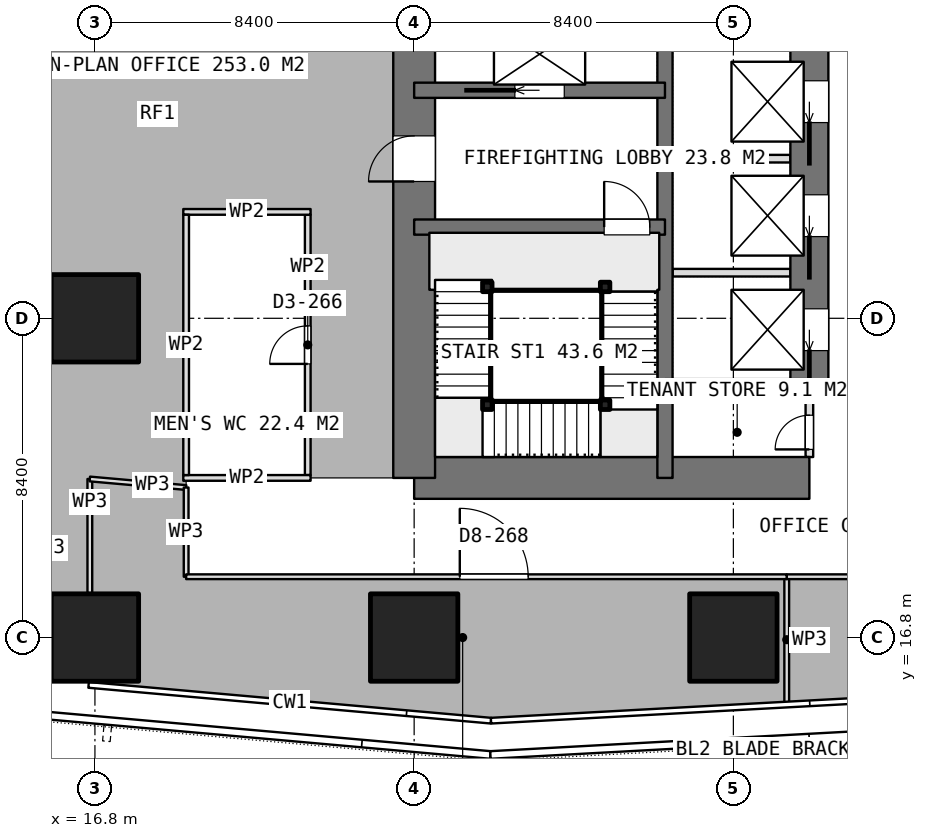
"""IFC4 building model, lengths in metres.
Left out: names, types, materials, properties, quantities, classifications, styles, units other than length and angle.
Written with IfcOpenShell. Run it as: python <this file> out.ifc"""

import sys

from ifc_helpers import new_model, si_unit, direction, frame, frame_2d, origin, origin_2d, place, context, subcontext, project, spatial, rectangle, extrude, element, fill, save


model = new_model("IFC4")
c1 = context("Model", 3, precision=1e-05, world=origin(), true_north=direction((0.0, 1.0)))
c2 = subcontext(c1, "Body", "Model", "MODEL_VIEW")
j1 = project(units=[si_unit("LENGTHUNIT", "METRE"), si_unit("PLANEANGLEUNIT", "RADIAN")], contexts=[c1])
p1 = place(None, origin())
s1 = spatial("IfcSite", under=j1, at=p1, CompositionType="ELEMENT")
p2 = place(p1, origin())
s2 = spatial("IfcBuilding", under=s1, at=p2, CompositionType="ELEMENT")
p3 = place(p2, frame((0.0, 0.0, 250.1)))
s3 = spatial("IfcBuildingStorey", under=s2, at=p3, CompositionType="ELEMENT", Elevation=250.1)
p4 = place(p3, frame((25.2, 21.0, 0.0), z_axis=(0.0, 0.0, 1.0), x_axis=(1.0, 0.0, 0.0)))
e1 = element("IfcWall", 1, at=p4, inside=s3, PredefinedType="SHEAR", context=c2, shape_type="SweptSolid", body=[
    extrude(rectangle(XDim=10.4, YDim=1.1, at=frame_2d((5.2, 0.0))), origin(), (0.0, 0.0, 1.0), 3.75),
])
p5 = place(p3, frame((25.2, 21.0, 0.0), z_axis=(0.0, 0.0, 1.0), x_axis=(0.0, 1.0, 0.0)))
e2 = element("IfcWall", 2, at=p5, inside=s3, PredefinedType="SHEAR", context=c2, shape_type="SweptSolid", body=[
    extrude(rectangle(XDim=25.2, YDim=1.1, at=frame_2d((12.6, 0.0))), origin(), (0.0, 0.0, 1.0), 3.75),
])
p6 = place(p5, frame((7.8, 0.0, 0.0)))
e3 = element("IfcOpeningElement", 3, at=p6, cuts=e2, PredefinedType="OPENING", context=c2, shape_type="SweptSolid", body=[
    extrude(rectangle(XDim=1.2, YDim=2.1, at=frame_2d((0.6, 1.05))), frame((0.0, 0.56, 0.0), z_axis=(0.0, -1.0, 0.0), x_axis=(1.0, 0.0, 0.0)), (0.0, 0.0, 1.0), 1.12),
])
p7 = place(p5, frame((14.25, 0.0, 0.0)))
e4 = element("IfcOpeningElement", 4, at=p7, cuts=e2, PredefinedType="OPENING", context=c2, shape_type="SweptSolid", body=[
    extrude(rectangle(XDim=0.9, YDim=2.1, at=frame_2d((0.45, 1.05))), frame((0.0, 0.56, 0.0), z_axis=(0.0, -1.0, 0.0), x_axis=(1.0, 0.0, 0.0)), (0.0, 0.0, 1.0), 1.12),
])
p8 = place(p5, frame((16.85, 0.0, 0.0)))
e5 = element("IfcOpeningElement", 5, at=p8, cuts=e2, PredefinedType="OPENING", context=c2, shape_type="SweptSolid", body=[
    extrude(rectangle(XDim=0.9, YDim=2.1, at=frame_2d((0.45, 1.05))), frame((0.0, 0.56, 0.0), z_axis=(0.0, -1.0, 0.0), x_axis=(1.0, 0.0, 0.0)), (0.0, 0.0, 1.0), 1.12),
])
p9 = place(p5, frame((19.0, 0.0, 0.0)))
e6 = element("IfcOpeningElement", 6, at=p9, cuts=e2, PredefinedType="OPENING", context=c2, shape_type="SweptSolid", body=[
    extrude(rectangle(XDim=1.2, YDim=2.1, at=frame_2d((0.6, 1.05))), frame((0.0, 0.56, 0.0), z_axis=(0.0, -1.0, 0.0), x_axis=(1.0, 0.0, 0.0)), (0.0, 0.0, 1.0), 1.12),
])
p10 = place(p3, frame((31.8, 21.0, 0.0), z_axis=(0.0, 0.0, 1.0), x_axis=(0.0, 1.0, 0.0)))
e7 = element("IfcWall", 7, at=p10, inside=s3, PredefinedType="SHEAR", context=c2, shape_type="SweptSolid", body=[
    extrude(rectangle(XDim=25.2, YDim=0.4, at=frame_2d((12.6, 0.0))), origin(), (0.0, 0.0, 1.0), 3.75),
])
p11 = place(p3, frame((35.6, 23.4, 0.0), z_axis=(0.0, 0.0, 1.0), x_axis=(0.0, 1.0, 0.0)))
e8 = element("IfcWall", 8, at=p11, inside=s3, PredefinedType="SHEAR", context=c2, shape_type="SweptSolid", body=[
    extrude(rectangle(XDim=18.0, YDim=1.0, at=frame_2d((9.0, 0.0))), origin(), (0.0, 0.0, 1.0), 3.75),
])
p12 = place(p11, frame((0.95, 0.0, 0.0)))
e9 = element("IfcOpeningElement", 9, at=p12, cuts=e8, PredefinedType="OPENING", context=c2, shape_type="SweptSolid", body=[
    extrude(rectangle(XDim=1.1, YDim=2.1, at=frame_2d((0.55, 1.05))), frame((0.0, 0.51, 0.0), z_axis=(0.0, -1.0, 0.0), x_axis=(1.0, 0.0, 0.0)), (0.0, 0.0, 1.0), 1.02),
])
p13 = place(p11, frame((3.95, 0.0, 0.0)))
e10 = element("IfcOpeningElement", 10, at=p13, cuts=e8, PredefinedType="OPENING", context=c2, shape_type="SweptSolid", body=[
    extrude(rectangle(XDim=1.1, YDim=2.1, at=frame_2d((0.55, 1.05))), frame((0.0, 0.51, 0.0), z_axis=(0.0, -1.0, 0.0), x_axis=(1.0, 0.0, 0.0)), (0.0, 0.0, 1.0), 1.02),
])
p14 = place(p11, frame((6.95, 0.0, 0.0)))
e11 = element("IfcOpeningElement", 11, at=p14, cuts=e8, PredefinedType="OPENING", context=c2, shape_type="SweptSolid", body=[
    extrude(rectangle(XDim=1.1, YDim=2.1, at=frame_2d((0.55, 1.05))), frame((0.0, 0.51, 0.0), z_axis=(0.0, -1.0, 0.0), x_axis=(1.0, 0.0, 0.0)), (0.0, 0.0, 1.0), 1.02),
])
p15 = place(p11, frame((9.95, 0.0, 0.0)))
e12 = element("IfcOpeningElement", 12, at=p15, cuts=e8, PredefinedType="OPENING", context=c2, shape_type="SweptSolid", body=[
    extrude(rectangle(XDim=1.1, YDim=2.1, at=frame_2d((0.55, 1.05))), frame((0.0, 0.51, 0.0), z_axis=(0.0, -1.0, 0.0), x_axis=(1.0, 0.0, 0.0)), (0.0, 0.0, 1.0), 1.02),
])
p16 = place(p11, frame((12.95, 0.0, 0.0)))
e13 = element("IfcOpeningElement", 13, at=p16, cuts=e8, PredefinedType="OPENING", context=c2, shape_type="SweptSolid", body=[
    extrude(rectangle(XDim=1.1, YDim=2.1, at=frame_2d((0.55, 1.05))), frame((0.0, 0.51, 0.0), z_axis=(0.0, -1.0, 0.0), x_axis=(1.0, 0.0, 0.0)), (0.0, 0.0, 1.0), 1.02),
])
p17 = place(p11, frame((15.95, 0.0, 0.0)))
e14 = element("IfcOpeningElement", 14, at=p17, cuts=e8, PredefinedType="OPENING", context=c2, shape_type="SweptSolid", body=[
    extrude(rectangle(XDim=1.1, YDim=2.1, at=frame_2d((0.55, 1.05))), frame((0.0, 0.51, 0.0), z_axis=(0.0, -1.0, 0.0), x_axis=(1.0, 0.0, 0.0)), (0.0, 0.0, 1.0), 1.02),
])
p18 = place(p3, frame((31.8, 23.4, 0.0), z_axis=(0.0, 0.0, 1.0), x_axis=(1.0, 0.0, 0.0)))
e15 = element("IfcWall", 15, at=p18, inside=s3, PredefinedType="SHEAR", context=c2, shape_type="SweptSolid", body=[
    extrude(rectangle(XDim=3.8, YDim=0.4, at=frame_2d((1.9, 0.0))), origin(), (0.0, 0.0, 1.0), 3.75),
])
p19 = place(p3, frame((25.2, 27.6, 0.0), z_axis=(0.0, 0.0, 1.0), x_axis=(1.0, 0.0, 0.0)))
e16 = element("IfcWall", 16, at=p19, inside=s3, PredefinedType="SHEAR", context=c2, shape_type="SweptSolid", body=[
    extrude(rectangle(XDim=6.6, YDim=0.4, at=frame_2d((3.3, 0.0))), origin(), (0.0, 0.0, 1.0), 3.75),
])
p20 = place(p19, frame((5.0, 0.0, 0.0)))
e17 = element("IfcOpeningElement", 17, at=p20, cuts=e16, PredefinedType="OPENING", context=c2, shape_type="SweptSolid", body=[
    extrude(rectangle(XDim=1.2, YDim=2.1, at=frame_2d((0.6, 1.05))), frame((0.0, 0.21, 0.0), z_axis=(0.0, -1.0, 0.0), x_axis=(1.0, 0.0, 0.0)), (0.0, 0.0, 1.0), 0.42),
])
p21 = place(p3, frame((25.2, 31.2, 0.0), z_axis=(0.0, 0.0, 1.0), x_axis=(1.0, 0.0, 0.0)))
e18 = element("IfcWall", 18, at=p21, inside=s3, PredefinedType="SHEAR", context=c2, shape_type="SweptSolid", body=[
    extrude(rectangle(XDim=6.6, YDim=0.4, at=frame_2d((3.3, 0.0))), origin(), (0.0, 0.0, 1.0), 3.75),
])
p22 = place(p21, frame((2.65, 0.0, 0.0)))
e19 = element("IfcOpeningElement", 19, at=p22, cuts=e18, PredefinedType="OPENING", context=c2, shape_type="SweptSolid", body=[
    extrude(rectangle(XDim=1.3, YDim=2.1, at=frame_2d((0.65, 1.05))), frame((0.0, 0.21, 0.0), z_axis=(0.0, -1.0, 0.0), x_axis=(1.0, 0.0, 0.0)), (0.0, 0.0, 1.0), 0.42),
])
for number, where, z_axis, x_axis in (
    (20, (16.8, 16.8, 0.0), (0.0, 0.0, 1.0), (1.0, 0.0, 0.0)),
    (21, (16.8, 25.2, 0.0), (0.0, 0.0, 1.0), (1.0, 0.0, 0.0)),
    (22, (25.2, 16.8, 0.0), (0.0, 0.0, 1.0), (1.0, 0.0, 0.0)),
    (23, (33.6, 16.8, 0.0), (0.0, 0.0, 1.0), (1.0, 0.0, 0.0)),
):
    element("IfcColumn", number, at=place(p3, frame(where, z_axis=z_axis, x_axis=x_axis)), inside=s3, PredefinedType="COLUMN", context=c2, shape_type="SweptSolid", body=[
        extrude(rectangle(XDim=2.3, YDim=2.3, at=origin_2d()), origin(), (0.0, 0.0, 1.0), 3.75),
    ])
for number, where, z_axis, x_axis in (
    (24, (32.0, 26.4, 0.0), (0.0, 0.0, 1.0), (1.0, 0.0, 0.0)),
    (25, (32.0, 29.4, 0.0), (0.0, 0.0, 1.0), (1.0, 0.0, 0.0)),
):
    element("IfcWall", number, at=place(p3, frame(where, z_axis=z_axis, x_axis=x_axis)), inside=s3, PredefinedType="PARTITIONING", context=c2, shape_type="SweptSolid", body=[
        extrude(rectangle(XDim=3.1, YDim=0.2, at=frame_2d((1.55, 0.0))), origin(), (0.0, 0.0, 1.0), 3.5),
    ])
p23 = place(p3, frame((35.6, 21.55, 0.0), z_axis=(0.0, 0.0, 1.0), x_axis=(0.0, 1.0, 0.0)))
e26 = element("IfcWall", 26, at=p23, inside=s3, PredefinedType="PARTITIONING", context=c2, shape_type="SweptSolid", body=[
    extrude(rectangle(XDim=1.65, YDim=0.2, at=frame_2d((0.825, 0.0))), origin(), (0.0, 0.0, 1.0), 3.5),
])
p24 = place(p23, frame((0.2, 0.0, 0.0)))
e27 = element("IfcOpeningElement", 27, at=p24, cuts=e26, PredefinedType="OPENING", context=c2, shape_type="SweptSolid", body=[
    extrude(rectangle(XDim=0.9, YDim=2.1, at=frame_2d((0.45, 1.05))), frame((0.0, 0.11, 0.0), z_axis=(0.0, -1.0, 0.0), x_axis=(1.0, 0.0, 0.0)), (0.0, 0.0, 1.0), 0.22),
])
for number, where, z_axis, x_axis in (
    (28, (19.125, 21.0, 0.0), (0.0, 0.0, 1.0), (1.0, 0.0, 0.0)),
    (29, (19.125, 28.0, 0.0), (0.0, 0.0, 1.0), (1.0, 0.0, 0.0)),
):
    element("IfcWall", number, at=place(p3, frame(where, z_axis=z_axis, x_axis=x_axis)), inside=s3, PredefinedType="PARTITIONING", context=c2, shape_type="SweptSolid", body=[
        extrude(rectangle(XDim=3.35, YDim=0.15, at=frame_2d((1.675, 0.0))), origin(), (0.0, 0.0, 1.0), 3.5),
    ])
p25 = place(p3, frame((19.2, 21.075, 0.0), z_axis=(0.0, 0.0, 1.0), x_axis=(0.0, 1.0, 0.0)))
e30 = element("IfcWall", 30, at=p25, inside=s3, PredefinedType="PARTITIONING", context=c2, shape_type="SweptSolid", body=[
    extrude(rectangle(XDim=6.85, YDim=0.15, at=frame_2d((3.425, 0.0))), origin(), (0.0, 0.0, 1.0), 3.5),
])
p26 = place(p3, frame((22.4, 21.075, 0.0), z_axis=(0.0, 0.0, 1.0), x_axis=(0.0, 1.0, 0.0)))
e31 = element("IfcWall", 31, at=p26, inside=s3, PredefinedType="PARTITIONING", context=c2, shape_type="SweptSolid", body=[
    extrude(rectangle(XDim=6.85, YDim=0.15, at=frame_2d((3.425, 0.0))), origin(), (0.0, 0.0, 1.0), 3.5),
])
p27 = place(p26, frame((2.925, 0.0, 0.0)))
e32 = element("IfcOpeningElement", 32, at=p27, cuts=e31, PredefinedType="OPENING", context=c2, shape_type="SweptSolid", body=[
    extrude(rectangle(XDim=1.0, YDim=2.1, at=frame_2d((0.5, 1.05))), frame((0.0, 0.085, 0.0), z_axis=(0.0, -1.0, 0.0), x_axis=(1.0, 0.0, 0.0)), (0.0, 0.0, 1.0), 0.17),
])
p28 = place(p3, frame((35.004, 15.087, 0.0), z_axis=(0.0, 0.0, 1.0), x_axis=(0.0, 1.0, 0.0)))
e33 = element("IfcWall", 33, at=p28, inside=s3, PredefinedType="PARTITIONING", context=c2, shape_type="SweptSolid", body=[
    extrude(rectangle(XDim=3.313, YDim=0.125, at=frame_2d((1.656, 0.0))), origin(), (0.0, 0.0, 1.0), 3.5),
])
p29 = place(p3, frame((35.004, 18.4, 0.0), z_axis=(0.0, 0.0, 1.0), x_axis=(1.0, 0.0, 0.0)))
e34 = element("IfcWall", 34, at=p29, inside=s3, PredefinedType="PARTITIONING", context=c2, shape_type="SweptSolid", body=[
    extrude(rectangle(XDim=16.604, YDim=0.125, at=frame_2d((8.302, 0.0))), origin(), (0.0, 0.0, 1.0), 3.5),
])
p30 = place(p29, frame((8.202, 0.0, 0.0)))
e35 = element("IfcOpeningElement", 35, at=p30, cuts=e34, PredefinedType="OPENING", context=c2, shape_type="SweptSolid", body=[
    extrude(rectangle(XDim=1.8, YDim=2.1, at=frame_2d((0.9, 1.05))), frame((0.0, 0.073, 0.0), z_axis=(0.0, -1.0, 0.0), x_axis=(1.0, 0.0, 0.0)), (0.0, 0.0, 1.0), 0.145),
])
p31 = place(p3, frame((16.666, 17.97, 0.0), z_axis=(0.0, 0.0, 1.0), x_axis=(0.0, 1.0, 0.0)))
e36 = element("IfcWall", 36, at=p31, inside=s3, PredefinedType="PARTITIONING", context=c2, shape_type="SweptSolid", body=[
    extrude(rectangle(XDim=3.002, YDim=0.125, at=frame_2d((1.501, 0.0))), origin(), (0.0, 0.0, 1.0), 3.5),
])
p32 = place(p3, frame((16.666, 20.972, 0.0), z_axis=(0.0, 0.0, 1.0), x_axis=(0.996085983525, -0.08838955495, 0.0)))
e37 = element("IfcWall", 37, at=p32, inside=s3, PredefinedType="PARTITIONING", context=c2, shape_type="SweptSolid", body=[
    extrude(rectangle(XDim=2.544, YDim=0.125, at=frame_2d((1.272, 0.0))), origin(), (0.0, 0.0, 1.0), 3.5),
])
p33 = place(p3, frame((19.2, 20.747, 0.0), z_axis=(0.0, 0.0, 1.0), x_axis=(0.0, -1.0, 0.0)))
e38 = element("IfcWall", 38, at=p33, inside=s3, PredefinedType="PARTITIONING", context=c2, shape_type="SweptSolid", body=[
    extrude(rectangle(XDim=2.347, YDim=0.125, at=frame_2d((1.174, 0.0))), origin(), (0.0, 0.0, 1.0), 3.5),
])
p34 = place(p3, frame((19.2, 18.4, 0.0), z_axis=(0.0, 0.0, 1.0), x_axis=(1.0, 0.0, 0.0)))
e39 = element("IfcWall", 39, at=p34, inside=s3, PredefinedType="PARTITIONING", context=c2, shape_type="SweptSolid", body=[
    extrude(rectangle(XDim=15.803, YDim=0.125, at=frame_2d((7.901, 0.0))), origin(), (0.0, 0.0, 1.0), 3.5),
])
p35 = place(p34, frame((7.201, 0.0, 0.0)))
e40 = element("IfcOpeningElement", 40, at=p35, cuts=e39, PredefinedType="OPENING", context=c2, shape_type="SweptSolid", body=[
    extrude(rectangle(XDim=1.8, YDim=2.1, at=frame_2d((0.9, 1.05))), frame((0.0, 0.073, 0.0), z_axis=(0.0, -1.0, 0.0), x_axis=(1.0, 0.0, 0.0)), (0.0, 0.0, 1.0), 0.145),
])
for number, where, z_axis, x_axis in (
    (41, (30.225, 26.025, 0.0), (0.0, 0.0, 1.0), (1.0, 0.0, 0.0)),
    (42, (30.225, 22.925, 0.0), (0.0, 0.0, 1.0), (1.0, 0.0, 0.0)),
    (43, (27.125, 22.925, 0.0), (0.0, 0.0, 1.0), (1.0, 0.0, 0.0)),
    (44, (27.125, 26.025, 0.0), (0.0, 0.0, 1.0), (1.0, 0.0, 0.0)),
):
    element("IfcColumn", number, at=place(p3, frame(where, z_axis=z_axis, x_axis=x_axis)), inside=s3, PredefinedType="COLUMN", context=c2, shape_type="SweptSolid", body=[
        extrude(rectangle(XDim=0.25, YDim=0.25, at=origin_2d()), origin(), (0.0, 0.0, 1.0), 3.75),
    ])
p36 = place(p6, origin())
e45 = element("IfcDoor", 45, at=p36, inside=s3, OperationType="SINGLE_SWING_LEFT", PredefinedType="DOOR", context=c2, shape_type="SweptSolid", body=[
    extrude(rectangle(XDim=1.2, YDim=2.1, at=frame_2d((0.6, 1.05))), frame((0.0, 0.025, 0.0), z_axis=(0.0, -1.0, 0.0), x_axis=(1.0, 0.0, 0.0)), (0.0, 0.0, 1.0), 0.05),
])
fill(e3, e45)
p37 = place(p24, origin())
e46 = element("IfcDoor", 46, at=p37, inside=s3, OperationType="SINGLE_SWING_LEFT", PredefinedType="DOOR", context=c2, shape_type="SweptSolid", body=[
    extrude(rectangle(XDim=0.9, YDim=2.1, at=frame_2d((0.45, 1.05))), frame((0.0, 0.025, 0.0), z_axis=(0.0, -1.0, 0.0), x_axis=(1.0, 0.0, 0.0)), (0.0, 0.0, 1.0), 0.05),
])
fill(e27, e46)
p38 = place(p12, origin())
e47 = element("IfcDoor", 47, at=p38, inside=s3, OperationType="SLIDING_TO_LEFT", PredefinedType="USERDEFINED", context=c2, shape_type="SweptSolid", body=[
    extrude(rectangle(XDim=1.1, YDim=2.1, at=frame_2d((0.55, 1.05))), frame((0.0, 0.025, 0.0), z_axis=(0.0, -1.0, 0.0), x_axis=(1.0, 0.0, 0.0)), (0.0, 0.0, 1.0), 0.05),
])
fill(e9, e47)
p39 = place(p13, origin())
e48 = element("IfcDoor", 48, at=p39, inside=s3, OperationType="SLIDING_TO_LEFT", PredefinedType="USERDEFINED", context=c2, shape_type="SweptSolid", body=[
    extrude(rectangle(XDim=1.1, YDim=2.1, at=frame_2d((0.55, 1.05))), frame((0.0, 0.025, 0.0), z_axis=(0.0, -1.0, 0.0), x_axis=(1.0, 0.0, 0.0)), (0.0, 0.0, 1.0), 0.05),
])
fill(e10, e48)
p40 = place(p14, origin())
e49 = element("IfcDoor", 49, at=p40, inside=s3, OperationType="SLIDING_TO_LEFT", PredefinedType="USERDEFINED", context=c2, shape_type="SweptSolid", body=[
    extrude(rectangle(XDim=1.1, YDim=2.1, at=frame_2d((0.55, 1.05))), frame((0.0, 0.025, 0.0), z_axis=(0.0, -1.0, 0.0), x_axis=(1.0, 0.0, 0.0)), (0.0, 0.0, 1.0), 0.05),
])
fill(e11, e49)
p41 = place(p22, origin())
e50 = element("IfcDoor", 50, at=p41, inside=s3, OperationType="SLIDING_TO_LEFT", PredefinedType="USERDEFINED", context=c2, shape_type="SweptSolid", body=[
    extrude(rectangle(XDim=1.3, YDim=2.1, at=frame_2d((0.65, 1.05))), frame((0.0, 0.025, 0.0), z_axis=(0.0, -1.0, 0.0), x_axis=(1.0, 0.0, 0.0)), (0.0, 0.0, 1.0), 0.05),
])
fill(e19, e50)
p42 = place(p27, origin())
e51 = element("IfcDoor", 51, at=p42, inside=s3, OperationType="SINGLE_SWING_LEFT", PredefinedType="DOOR", context=c2, shape_type="SweptSolid", body=[
    extrude(rectangle(XDim=1.0, YDim=2.1, at=frame_2d((0.5, 1.05))), frame((0.0, 0.025, 0.0), z_axis=(0.0, -1.0, 0.0), x_axis=(1.0, 0.0, 0.0)), (0.0, 0.0, 1.0), 0.05),
])
fill(e32, e51)
p43 = place(p35, origin())
e52 = element("IfcDoor", 52, at=p43, inside=s3, OperationType="DOUBLE_DOOR_SINGLE_SWING", PredefinedType="DOOR", context=c2, shape_type="SweptSolid", body=[
    extrude(rectangle(XDim=1.8, YDim=2.1, at=frame_2d((0.9, 1.05))), frame((0.0, 0.025, 0.0), z_axis=(0.0, -1.0, 0.0), x_axis=(1.0, 0.0, 0.0)), (0.0, 0.0, 1.0), 0.05),
])
fill(e40, e52)
p44 = place(p20, origin())
e53 = element("IfcDoor", 53, at=p44, inside=s3, OperationType="SINGLE_SWING_RIGHT", PredefinedType="DOOR", context=c2, shape_type="SweptSolid", body=[
    extrude(rectangle(XDim=1.2, YDim=2.1, at=frame_2d((0.6, 1.05))), frame((0.0, 0.025, 0.0), z_axis=(0.0, -1.0, 0.0), x_axis=(1.0, 0.0, 0.0)), (0.0, 0.0, 1.0), 0.05),
])
fill(e17, e53)
save(model, sys.argv[1])
